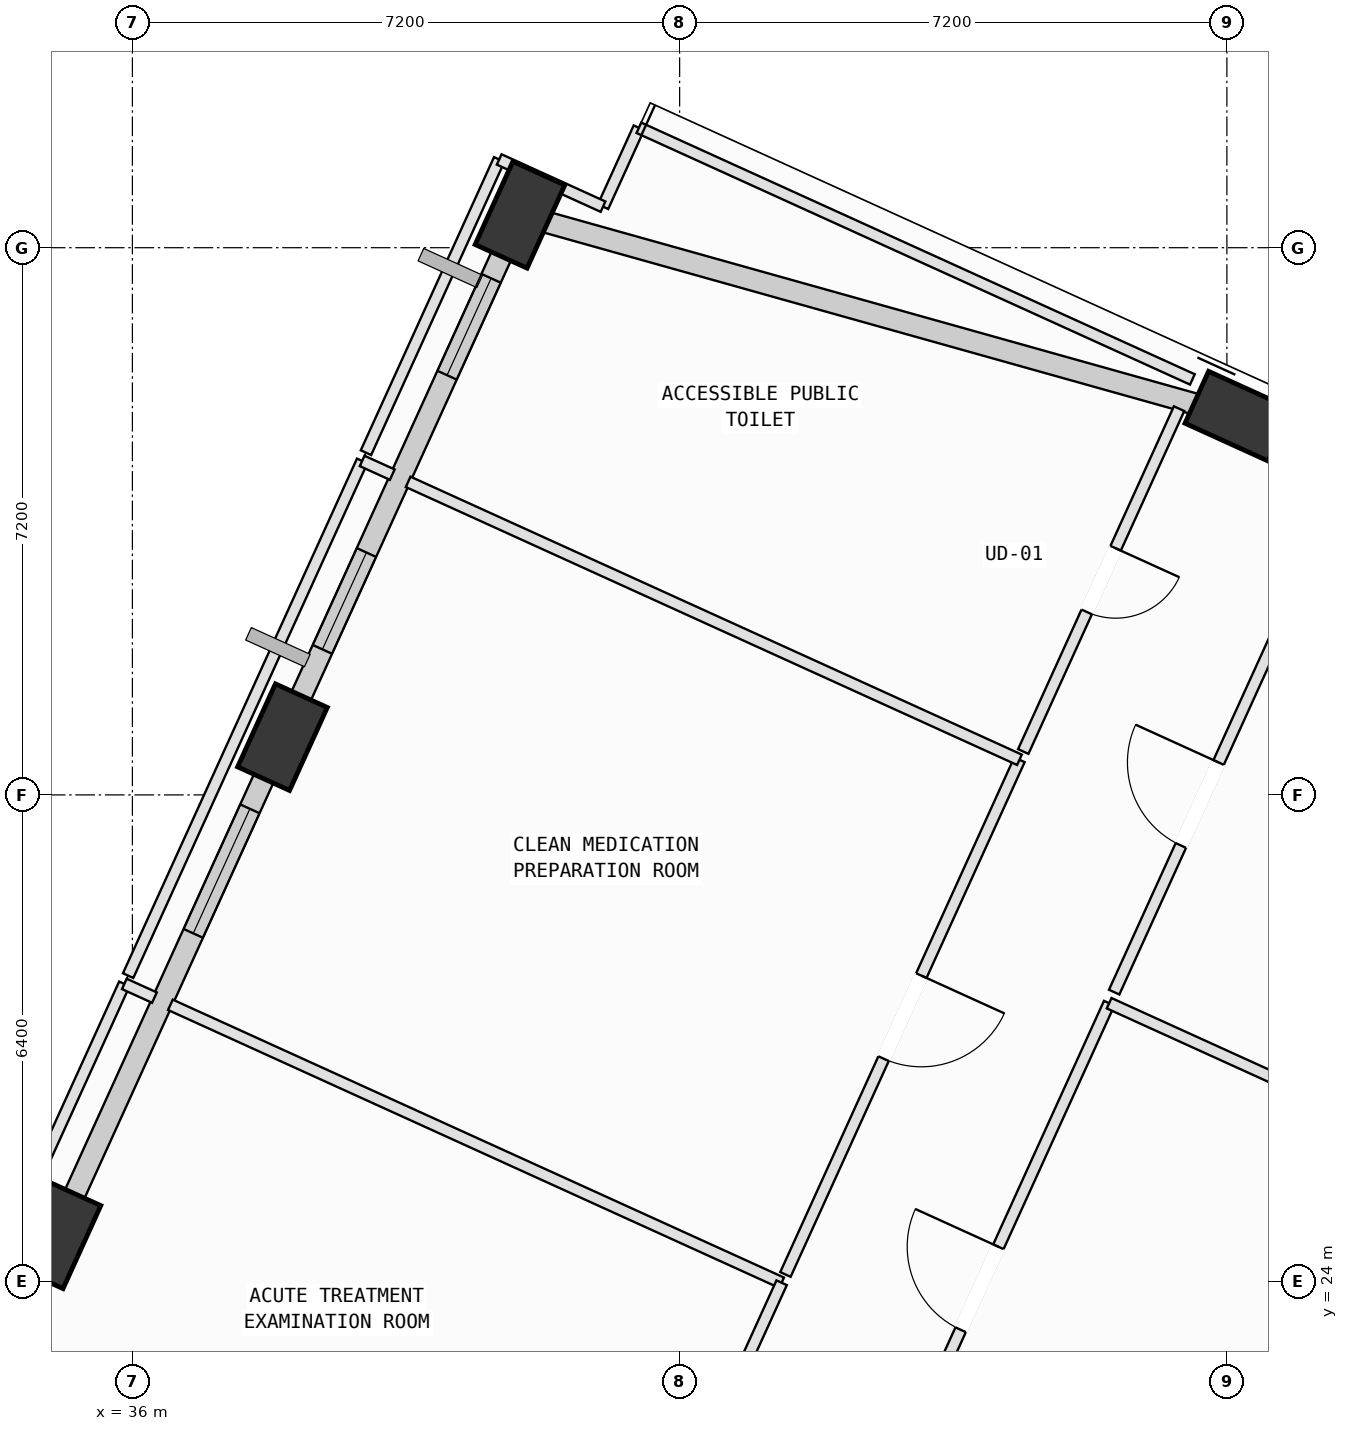
"""IFC4 building model, lengths in metres.
Left out: names, types, materials, properties, quantities, classifications, styles, units other than length and angle.
Written with IfcOpenShell. Run it as: python <this file> out.ifc"""

import sys

from ifc_helpers import new_model, si_unit, direction, frame, frame_2d, origin, origin_2d, place, context, subcontext, project, spatial, rectangle, extrude, element, fill, save


model = new_model("IFC4")
c1 = context("Model", 3, precision=1e-05, world=origin(), true_north=direction((0.0, 1.0)))
c2 = subcontext(c1, "Body", "Model", "MODEL_VIEW")
j1 = project(units=[si_unit("LENGTHUNIT", "METRE"), si_unit("PLANEANGLEUNIT", "RADIAN")], contexts=[c1])
p1 = place(None, origin())
s1 = spatial("IfcSite", under=j1, at=p1, CompositionType="ELEMENT")
p2 = place(p1, origin())
s2 = spatial("IfcBuilding", under=s1, at=p2, CompositionType="ELEMENT")
p3 = place(p2, frame((0.0, 0.0, 304.6)))
s3 = spatial("IfcBuildingStorey", under=s2, at=p3, CompositionType="ELEMENT", Elevation=304.6)
p4 = place(p3, frame((50.55, 35.383, 0.002), z_axis=(-0.044259952808, 0.069657028792, 0.996588658834), x_axis=(0.989554992993, 0.140050346374, 0.034158693237)))
e1 = element("IfcColumn", 1, at=p4, inside=s3, PredefinedType="COLUMN", context=c2, shape_type="SweptSolid", body=[
    extrude(rectangle(XDim=1.2, YDim=0.75, at=origin_2d()), origin(), (0.0, 0.0, 1.0), 3.96),
])
p5 = place(p3, frame((41.099, 38.033, 0.002), z_axis=(-0.055000119762, 0.030583026236, 0.998017868243), x_axis=(0.59287515224, -0.803254115169, 0.05728769782)))
e2 = element("IfcColumn", 2, at=p5, inside=s3, PredefinedType="COLUMN", context=c2, shape_type="SweptSolid", body=[
    extrude(rectangle(XDim=1.2, YDim=0.75, at=origin_2d()), origin(), (0.0, 0.0, 1.0), 3.959),
])
p6 = place(p3, frame((37.975, 31.16, 0.002), z_axis=(-0.026531794575, 0.017933527814, 0.999487094692), x_axis=(0.522025712145, -0.852431403283, 0.029152333625)))
e3 = element("IfcColumn", 3, at=p6, inside=s3, PredefinedType="COLUMN", context=c2, shape_type="SweptSolid", body=[
    extrude(rectangle(XDim=1.2, YDim=0.75, at=origin_2d()), origin(), (0.0, 0.0, 1.0), 3.975),
])
p7 = place(p3, frame((34.994, 24.605, 0.002), z_axis=(0.000795093642, 0.005749138642, 0.999983157474), x_axis=(-0.534703352063, -0.84502331988, 0.005283384443)))
e4 = element("IfcColumn", 4, at=p7, inside=s3, PredefinedType="COLUMN", context=c2, shape_type="SweptSolid", body=[
    extrude(rectangle(XDim=1.2, YDim=0.75, at=origin_2d()), origin(), (0.0, 0.0, 1.0), 3.992),
])
p8 = place(p3, frame((50.777, 35.281, 0.0), z_axis=(0.0, 0.0, 1.0), x_axis=(0.910317820998, -0.413909971821, 0.0)))
e5 = element("IfcWall", 5, at=p8, inside=s3, PredefinedType="SOLIDWALL", context=c2, shape_type="SweptSolid", body=[
    extrude(rectangle(XDim=7.046, YDim=0.28, at=frame_2d((3.523, 0.0))), origin(), (0.0, 0.0, 1.0), 3.265),
])
p9 = place(p3, frame((41.363, 37.959, 0.0), z_axis=(0.0, 0.0, 1.0), x_axis=(0.962879231583, -0.269932557107, 0.0)))
e6 = element("IfcWall", 6, at=p9, inside=s3, PredefinedType="SOLIDWALL", context=c2, shape_type="SweptSolid", body=[
    extrude(rectangle(XDim=9.036, YDim=0.28, at=frame_2d((4.518, 0.0))), origin(), (0.0, 0.0, 1.0), 3.265),
])
p10 = place(p3, frame((38.141, 31.527, 0.0), z_axis=(0.0, 0.0, 1.0), x_axis=(0.413895186135, 0.910324543717, 0.0)))
e7 = element("IfcWall", 7, at=p10, inside=s3, PredefinedType="SOLIDWALL", context=c2, shape_type="SweptSolid", body=[
    extrude(rectangle(XDim=6.78, YDim=0.28, at=frame_2d((3.39, 0.0))), origin(), (0.0, 0.0, 1.0), 3.265),
])
p11 = place(p10, frame((0.866, 0.0, 0.75)))
e8 = element("IfcOpeningElement", 8, at=p11, cuts=e7, PredefinedType="OPENING", context=c2, shape_type="SweptSolid", body=[
    extrude(rectangle(XDim=1.4, YDim=1.85, at=frame_2d((0.7, 0.925))), frame((0.0, 0.15, 0.0), z_axis=(0.0, -1.0, 0.0), x_axis=(1.0, 0.0, 0.0)), (0.0, 0.0, 1.0), 0.3),
])
p12 = place(p10, frame((4.829, 0.0, 0.75)))
e9 = element("IfcOpeningElement", 9, at=p12, cuts=e7, PredefinedType="OPENING", context=c2, shape_type="SweptSolid", body=[
    extrude(rectangle(XDim=1.4, YDim=1.85, at=frame_2d((0.7, 0.925))), frame((0.0, 0.15, 0.0), z_axis=(0.0, -1.0, 0.0), x_axis=(1.0, 0.0, 0.0)), (0.0, 0.0, 1.0), 0.3),
])
p13 = place(p3, frame((35.164, 24.977, 0.0), z_axis=(0.0, 0.0, 1.0), x_axis=(0.413860341101, 0.910340385825, 0.0)))
e10 = element("IfcWall", 10, at=p13, inside=s3, PredefinedType="SOLIDWALL", context=c2, shape_type="SweptSolid", body=[
    extrude(rectangle(XDim=6.409, YDim=0.28, at=frame_2d((3.205, 0.0))), origin(), (0.0, 0.0, 1.0), 3.265),
])
p14 = place(p13, frame((3.956, 0.0, 0.75)))
e11 = element("IfcOpeningElement", 11, at=p14, cuts=e10, PredefinedType="OPENING", context=c2, shape_type="SweptSolid", body=[
    extrude(rectangle(XDim=1.8, YDim=2.05, at=frame_2d((0.9, 1.025))), frame((0.0, 0.15, 0.0), z_axis=(0.0, -1.0, 0.0), x_axis=(1.0, 0.0, 0.0)), (0.0, 0.0, 1.0), 0.3),
])
p15 = place(p3, frame((32.286, 18.648, 0.0), z_axis=(0.0, 0.0, 1.0), x_axis=(0.413925403212, 0.910310804383, 0.0)))
e12 = element("IfcWall", 12, at=p15, inside=s3, PredefinedType="SOLIDWALL", context=c2, shape_type="SweptSolid", body=[
    extrude(rectangle(XDim=6.158, YDim=0.28, at=frame_2d((3.079, 0.0))), origin(), (0.0, 0.0, 1.0), 3.265),
])
p16 = place(p15, frame((3.935, 0.0, 0.75)))
e13 = element("IfcOpeningElement", 13, at=p16, cuts=e12, PredefinedType="OPENING", context=c2, shape_type="SweptSolid", body=[
    extrude(rectangle(XDim=1.2, YDim=1.75, at=frame_2d((0.6, 0.875))), frame((0.0, 0.15, 0.0), z_axis=(0.0, -1.0, 0.0), x_axis=(1.0, 0.0, 0.0)), (0.0, 0.0, 1.0), 0.3),
])
p17 = place(p3, frame((45.44, 20.158, 0.0), z_axis=(0.0, 0.0, 1.0), x_axis=(0.413963660089, 0.910293407713, 0.0)))
e14 = element("IfcWall", 14, at=p17, inside=s3, PredefinedType="PARTITIONING", context=c2, shape_type="SweptSolid", body=[
    extrude(rectangle(XDim=8.24, YDim=0.15, at=frame_2d((4.12, 0.0))), origin(), (0.0, 0.0, 1.0), 3.415),
])
p18 = place(p17, frame((3.52, 0.0, 0.0)))
e15 = element("IfcOpeningElement", 15, at=p18, cuts=e14, PredefinedType="OPENING", context=c2, shape_type="SweptSolid", body=[
    extrude(rectangle(XDim=1.2, YDim=2.15, at=frame_2d((0.6, 1.075))), frame((0.0, 0.085, 0.0), z_axis=(0.0, -1.0, 0.0), x_axis=(1.0, 0.0, 0.0)), (0.0, 0.0, 1.0), 0.17),
])
p19 = place(p3, frame((48.851, 27.659, 0.0), z_axis=(0.0, 0.0, 1.0), x_axis=(0.910326595448, -0.413890673513, 0.0)))
e16 = element("IfcWall", 16, at=p19, inside=s3, PredefinedType="PARTITIONING", context=c2, shape_type="SweptSolid", body=[
    extrude(rectangle(XDim=9.435, YDim=0.15, at=frame_2d((4.717, 0.0))), origin(), (0.0, 0.0, 1.0), 3.78),
])
p20 = place(p3, frame((48.917, 27.805, 0.0), z_axis=(0.0, 0.0, 1.0), x_axis=(0.413951711355, 0.910298841406, 0.0)))
e17 = element("IfcWall", 17, at=p20, inside=s3, PredefinedType="PARTITIONING", context=c2, shape_type="SweptSolid", body=[
    extrude(rectangle(XDim=5.44, YDim=0.15, at=frame_2d((2.72, 0.0))), origin(), (0.0, 0.0, 1.0), 3.78),
])
p21 = place(p20, frame((2.12, 0.0, 0.0)))
e18 = element("IfcOpeningElement", 18, at=p21, cuts=e17, PredefinedType="OPENING", context=c2, shape_type="SweptSolid", body=[
    extrude(rectangle(XDim=1.2, YDim=2.15, at=frame_2d((0.6, 1.075))), frame((0.0, 0.085, 0.0), z_axis=(0.0, -1.0, 0.0), x_axis=(1.0, 0.0, 0.0)), (0.0, 0.0, 1.0), 0.17),
])
p22 = place(p3, frame((32.696, 20.88, 0.0), z_axis=(0.0, 0.0, 1.0), x_axis=(0.413919598697, 0.910313443718, 0.0)))
e19 = element("IfcWall", 19, at=p22, inside=s3, PredefinedType="PARTITIONING", context=c2, shape_type="SweptSolid", body=[
    extrude(rectangle(XDim=7.726, YDim=0.15, at=frame_2d((3.863, 0.0))), origin(), (0.0, 0.0, 1.0), 3.78),
])
p23 = place(p3, frame((35.894, 27.913, 0.0), z_axis=(0.0, 0.0, 1.0), x_axis=(0.910212670279, -0.414141153308, 0.0)))
e20 = element("IfcWall", 20, at=p23, inside=s3, PredefinedType="PARTITIONING", context=c2, shape_type="SweptSolid", body=[
    extrude(rectangle(XDim=0.435, YDim=0.15, at=frame_2d((0.218, 0.0))), origin(), (0.0, 0.0, 1.0), 3.78),
])
p24 = place(p3, frame((36.5, 27.638, 0.0), z_axis=(0.0, 0.0, 1.0), x_axis=(0.910301163937, -0.413946603965, 0.0)))
e21 = element("IfcWall", 21, at=p24, inside=s3, PredefinedType="PARTITIONING", context=c2, shape_type="SweptSolid", body=[
    extrude(rectangle(XDim=8.834, YDim=0.15, at=frame_2d((4.417, 0.0))), origin(), (0.0, 0.0, 1.0), 3.78),
])
p25 = place(p3, frame((44.542, 23.981, 0.0), z_axis=(0.0, 0.0, 1.0), x_axis=(-0.413833170361, -0.910352737739, 0.0)))
e22 = element("IfcWall", 22, at=p25, inside=s3, PredefinedType="PARTITIONING", context=c2, shape_type="SweptSolid", body=[
    extrude(rectangle(XDim=11.562, YDim=0.15, at=frame_2d((5.781, 0.0))), origin(), (0.0, 0.0, 1.0), 3.78),
])
p26 = place(p25, frame((5.181, 0.0, 0.0)))
e23 = element("IfcOpeningElement", 23, at=p26, cuts=e22, PredefinedType="OPENING", context=c2, shape_type="SweptSolid", body=[
    extrude(rectangle(XDim=1.2, YDim=2.15, at=frame_2d((0.6, 1.075))), frame((0.0, 0.085, 0.0), z_axis=(0.0, -1.0, 0.0), x_axis=(1.0, 0.0, 0.0)), (0.0, 0.0, 1.0), 0.17),
])
p27 = place(p3, frame((47.671, 30.862, 0.0), z_axis=(0.0, 0.0, 1.0), x_axis=(-0.41387959528, -0.910331632215, 0.0)))
e24 = element("IfcWall", 24, at=p27, inside=s3, PredefinedType="PARTITIONING", context=c2, shape_type="SweptSolid", body=[
    extrude(rectangle(XDim=7.439, YDim=0.15, at=frame_2d((3.719, 0.0))), origin(), (0.0, 0.0, 1.0), 3.78),
])
p28 = place(p27, frame((3.12, 0.0, 0.0)))
e25 = element("IfcOpeningElement", 25, at=p28, cuts=e24, PredefinedType="OPENING", context=c2, shape_type="SweptSolid", body=[
    extrude(rectangle(XDim=1.2, YDim=2.15, at=frame_2d((0.6, 1.075))), frame((0.0, 0.085, 0.0), z_axis=(0.0, -1.0, 0.0), x_axis=(1.0, 0.0, 0.0)), (0.0, 0.0, 1.0), 0.17),
])
p29 = place(p3, frame((35.944, 28.022, 0.0), z_axis=(0.0, 0.0, 1.0), x_axis=(0.41387959528, 0.910331632215, 0.0)))
e26 = element("IfcWall", 26, at=p29, inside=s3, PredefinedType="PARTITIONING", context=c2, shape_type="SweptSolid", body=[
    extrude(rectangle(XDim=7.439, YDim=0.15, at=frame_2d((3.719, 0.0))), origin(), (0.0, 0.0, 1.0), 3.265),
])
p30 = place(p3, frame((39.023, 34.794, 0.0), z_axis=(0.0, 0.0, 1.0), x_axis=(0.910424136148, -0.413676071727, 0.0)))
e27 = element("IfcWall", 27, at=p30, inside=s3, PredefinedType="PARTITIONING", context=c2, shape_type="SweptSolid", body=[
    extrude(rectangle(XDim=0.435, YDim=0.15, at=frame_2d((0.218, 0.0))), origin(), (0.0, 0.0, 1.0), 3.78),
])
p31 = place(p3, frame((39.628, 34.519, 0.0), z_axis=(0.0, 0.0, 1.0), x_axis=(0.910320102394, -0.413904954279, 0.0)))
e28 = element("IfcWall", 28, at=p31, inside=s3, PredefinedType="PARTITIONING", context=c2, shape_type="SweptSolid", body=[
    extrude(rectangle(XDim=8.835, YDim=0.15, at=frame_2d((4.417, 0.0))), origin(), (0.0, 0.0, 1.0), 3.78),
])
p32 = place(p3, frame((42.192, 38.14, 0.0), z_axis=(0.0, 0.0, 1.0), x_axis=(0.414028740903, 0.910263808852, 0.0)))
e29 = element("IfcWall", 29, at=p32, inside=s3, PredefinedType="PARTITIONING", context=c2, shape_type="SweptSolid", body=[
    extrude(rectangle(XDim=1.14, YDim=0.15, at=frame_2d((0.57, 0.0))), origin(), (0.0, 0.0, 1.0), 3.78),
])
p33 = place(p3, frame((42.664, 39.178, 0.0), z_axis=(0.0, 0.0, 1.0), x_axis=(0.910317346535, -0.413911015312, 0.0)))
e30 = element("IfcWall", 30, at=p33, inside=s3, PredefinedType="PARTITIONING", context=c2, shape_type="SweptSolid", body=[
    extrude(rectangle(XDim=7.999, YDim=0.15, at=frame_2d((4.0, 0.0))), origin(), (0.0, 0.0, 1.0), 3.265),
])
p34 = place(p3, frame((49.771, 35.482, 0.0), z_axis=(0.0, 0.0, 1.0), x_axis=(-0.413736122394, -0.910396848098, 0.0)))
e31 = element("IfcWall", 31, at=p34, inside=s3, PredefinedType="PARTITIONING", context=c2, shape_type="SweptSolid", body=[
    extrude(rectangle(XDim=4.955, YDim=0.15, at=frame_2d((2.478, 0.0))), origin(), (0.0, 0.0, 1.0), 2.765),
])
p35 = place(p34, frame((2.018, 0.0, 0.0)))
e32 = element("IfcOpeningElement", 32, at=p35, cuts=e31, PredefinedType="OPENING", context=c2, shape_type="SweptSolid", body=[
    extrude(rectangle(XDim=0.92, YDim=2.1, at=frame_2d((0.46, 1.05))), frame((0.0, 0.085, 0.0), z_axis=(0.0, -1.0, 0.0), x_axis=(1.0, 0.0, 0.0)), (0.0, 0.0, 1.0), 0.17),
])
p36 = place(p3, frame((39.073, 34.903, 0.0), z_axis=(0.0, 0.0, 1.0), x_axis=(0.413672715322, 0.910425661215, 0.0)))
e33 = element("IfcWall", 33, at=p36, inside=s3, PredefinedType="PARTITIONING", context=c2, shape_type="SweptSolid", body=[
    extrude(rectangle(XDim=4.238, YDim=0.15, at=frame_2d((2.119, 0.0))), origin(), (0.0, 0.0, 1.0), 3.265),
])
p37 = place(p3, frame((40.826, 38.761, 0.0), z_axis=(0.0, 0.0, 1.0), x_axis=(0.910316322976, -0.413913266426, 0.0)))
e34 = element("IfcWall", 34, at=p37, inside=s3, PredefinedType="PARTITIONING", context=c2, shape_type="SweptSolid", body=[
    extrude(rectangle(XDim=1.5, YDim=0.15, at=frame_2d((0.75, 0.0))), origin(), (0.0, 0.0, 1.0), 3.265),
])
p38 = place(p11, origin())
e35 = element("IfcWindow", 35, at=p38, inside=s3, PartitioningType="SINGLE_PANEL", PredefinedType="WINDOW", context=c2, shape_type="SweptSolid", body=[
    extrude(rectangle(XDim=1.4, YDim=1.85, at=frame_2d((0.7, 0.925))), frame((0.0, 0.03, 0.0), z_axis=(0.0, -1.0, 0.0), x_axis=(1.0, 0.0, 0.0)), (0.0, 0.0, 1.0), 0.06),
])
fill(e8, e35)
p39 = place(p12, origin())
e36 = element("IfcWindow", 36, at=p39, inside=s3, PartitioningType="SINGLE_PANEL", PredefinedType="WINDOW", context=c2, shape_type="SweptSolid", body=[
    extrude(rectangle(XDim=1.4, YDim=1.85, at=frame_2d((0.7, 0.925))), frame((0.0, 0.03, 0.0), z_axis=(0.0, -1.0, 0.0), x_axis=(1.0, 0.0, 0.0)), (0.0, 0.0, 1.0), 0.06),
])
fill(e9, e36)
p40 = place(p14, origin())
e37 = element("IfcWindow", 37, at=p40, inside=s3, PartitioningType="SINGLE_PANEL", PredefinedType="WINDOW", context=c2, shape_type="SweptSolid", body=[
    extrude(rectangle(XDim=1.8, YDim=2.05, at=frame_2d((0.9, 1.025))), frame((0.0, 0.03, 0.0), z_axis=(0.0, -1.0, 0.0), x_axis=(1.0, 0.0, 0.0)), (0.0, 0.0, 1.0), 0.06),
])
fill(e11, e37)
p41 = place(p18, origin())
e38 = element("IfcDoor", 38, at=p41, inside=s3, OperationType="SINGLE_SWING_RIGHT", PredefinedType="DOOR", context=c2, shape_type="SweptSolid", body=[
    extrude(rectangle(XDim=1.2, YDim=2.15, at=frame_2d((0.6, 1.075))), frame((0.0, 0.025, 0.0), z_axis=(0.0, -1.0, 0.0), x_axis=(1.0, 0.0, 0.0)), (0.0, 0.0, 1.0), 0.05),
])
fill(e15, e38)
p42 = place(p21, origin())
e39 = element("IfcDoor", 39, at=p42, inside=s3, OperationType="SINGLE_SWING_RIGHT", PredefinedType="DOOR", context=c2, shape_type="SweptSolid", body=[
    extrude(rectangle(XDim=1.2, YDim=2.15, at=frame_2d((0.6, 1.075))), frame((0.0, 0.025, 0.0), z_axis=(0.0, -1.0, 0.0), x_axis=(1.0, 0.0, 0.0)), (0.0, 0.0, 1.0), 0.05),
])
fill(e18, e39)
p43 = place(p28, origin())
e40 = element("IfcDoor", 40, at=p43, inside=s3, OperationType="SINGLE_SWING_LEFT", PredefinedType="DOOR", context=c2, shape_type="SweptSolid", body=[
    extrude(rectangle(XDim=1.2, YDim=2.15, at=frame_2d((0.6, 1.075))), frame((0.0, 0.025, 0.0), z_axis=(0.0, -1.0, 0.0), x_axis=(1.0, 0.0, 0.0)), (0.0, 0.0, 1.0), 0.05),
])
fill(e25, e40)
p44 = place(p35, origin())
e41 = element("IfcDoor", 41, at=p44, inside=s3, OperationType="SINGLE_SWING_LEFT", PredefinedType="DOOR", context=c2, shape_type="SweptSolid", body=[
    extrude(rectangle(XDim=0.92, YDim=2.1, at=frame_2d((0.46, 1.05))), frame((0.0, 0.025, 0.0), z_axis=(0.0, -1.0, 0.0), x_axis=(1.0, 0.0, 0.0)), (0.0, 0.0, 1.0), 0.05),
])
fill(e32, e41)
save(model, sys.argv[1])
